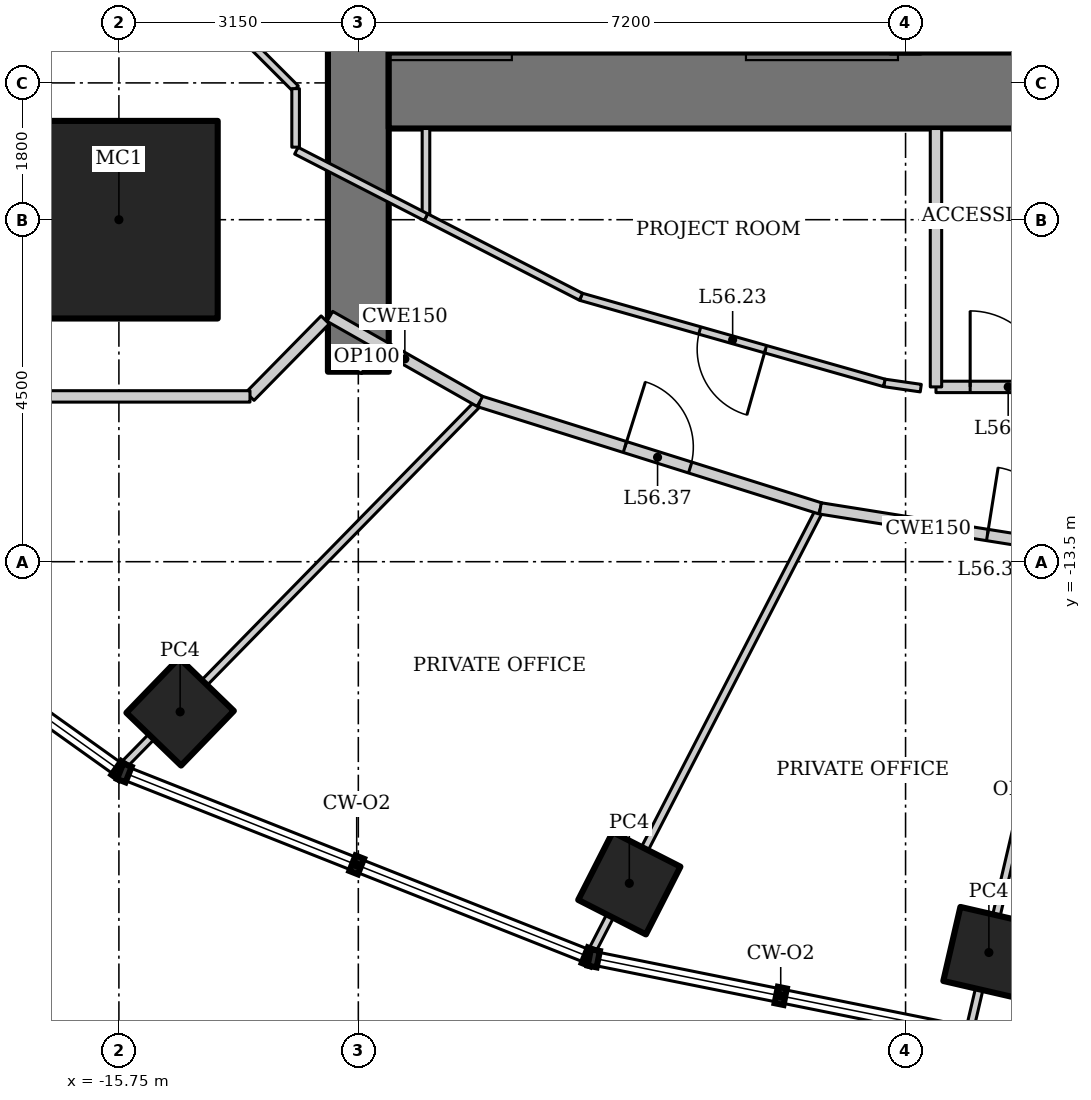
"""IFC4 building model, lengths in metres.
Left out: names, types, materials, properties, quantities, classifications, styles, units other than length and angle.
Written with IfcOpenShell. Run it as: python <this file> out.ifc"""

import sys

from ifc_helpers import new_model, si_unit, direction, frame, frame_2d, origin, origin_2d, place, context, subcontext, project, spatial, rectangle, hollow_rectangle, extrude, element, fill, save


model = new_model("IFC4")
c1 = context("Model", 3, precision=1e-05, world=origin(), true_north=direction((0.0, 1.0)))
c2 = subcontext(c1, "Body", "Model", "MODEL_VIEW")
j1 = project(units=[si_unit("LENGTHUNIT", "METRE"), si_unit("PLANEANGLEUNIT", "RADIAN")], contexts=[c1])
p1 = place(None, origin())
s1 = spatial("IfcSite", under=j1, at=p1, CompositionType="ELEMENT")
p2 = place(p1, origin())
s2 = spatial("IfcBuilding", under=s1, at=p2, CompositionType="ELEMENT")
p3 = place(p2, frame((0.0, 0.0, 241.0)))
s3 = spatial("IfcBuildingStorey", under=s2, at=p3, CompositionType="ELEMENT", Elevation=241.0)
p4 = place(p3, frame((-15.75, -9.0, 0.0), z_axis=(0.0, 0.0, 1.0), x_axis=(1.0, 0.0, 0.0)))
e1 = element("IfcColumn", 1, at=p4, inside=s3, PredefinedType="COLUMN", context=c2, shape_type="SweptSolid", body=[
    extrude(hollow_rectangle(XDim=2.6, YDim=2.6, WallThickness=0.13, at=origin_2d()), origin(), (0.0, 0.0, 1.0), 4.2),
])
for number, where, z_axis, x_axis in (
    (2, (-14.944, -15.475, 0.0), (0.0, 0.0, 1.0), (0.695, 0.719, 0.0)),
    (3, (-9.035, -17.731, 0.0), (0.0, 0.0, 1.0), (0.454, 0.891, 0.0)),
    (4, (-4.304, -18.642, 0.0), (0.0, 0.0, 1.0), (0.225, 0.974, 0.0)),
):
    element("IfcColumn", number, at=place(p3, frame(where, z_axis=z_axis, x_axis=x_axis)), inside=s3, PredefinedType="COLUMN", context=c2, shape_type="SweptSolid", body=[
        extrude(hollow_rectangle(XDim=1.0, YDim=1.0, WallThickness=0.08, at=origin_2d()), origin(), (0.0, 0.0, 1.0), 4.2),
    ])
p5 = place(p3, frame((-12.6, 11.0, 0.0), z_axis=(0.0, 0.0, 1.0), x_axis=(0.0, -1.0, 0.0)))
e5 = element("IfcWall", 5, at=p5, inside=s3, PredefinedType="SHEAR", context=c2, shape_type="SweptSolid", body=[
    extrude(rectangle(XDim=22.0, YDim=0.8, at=frame_2d((11.0, 0.0))), origin(), (0.0, 0.0, 1.0), 4.2),
])
p6 = place(p5, frame((10.1, 0.0, 0.0)))
e6 = element("IfcOpeningElement", 6, at=p6, cuts=e5, PredefinedType="OPENING", context=c2, shape_type="SweptSolid", body=[
    extrude(rectangle(XDim=1.8, YDim=2.1, at=frame_2d((0.9, 1.05))), frame((0.0, 0.41, 0.0), z_axis=(0.0, -1.0, 0.0), x_axis=(1.0, 0.0, 0.0)), (0.0, 0.0, 1.0), 0.82),
])
p7 = place(p3, frame((-12.2, -7.3, 0.0), z_axis=(0.0, 0.0, 1.0), x_axis=(1.0, 0.0, 0.0)))
e7 = element("IfcWall", 7, at=p7, inside=s3, PredefinedType="SHEAR", context=c2, shape_type="SweptSolid", body=[
    extrude(rectangle(XDim=24.4, YDim=1.0, at=frame_2d((12.2, 0.0))), origin(), (0.0, 0.0, 1.0), 4.2),
])
p8 = place(p3, frame((-15.709, -16.199, 0.0), z_axis=(0.0, 0.0, 1.0), x_axis=(0.699758297028, 0.71437967898, 0.0)))
e8 = element("IfcWall", 8, at=p8, inside=s3, PredefinedType="PARTITIONING", context=c2, shape_type="SweptSolid", body=[
    extrude(rectangle(XDim=6.729, YDim=0.1, at=frame_2d((3.365, 0.0))), origin(), (0.0, 0.0, 1.0), 3.41),
])
p9 = place(p3, frame((-9.54, -18.65, 0.0), z_axis=(0.0, 0.0, 1.0), x_axis=(0.458420942987, 0.888735190611, 0.0)))
e9 = element("IfcWall", 9, at=p9, inside=s3, PredefinedType="PARTITIONING", context=c2, shape_type="SweptSolid", body=[
    extrude(rectangle(XDim=6.584, YDim=0.1, at=frame_2d((3.292, 0.0))), origin(), (0.0, 0.0, 1.0), 3.293),
])
p10 = place(p3, frame((-4.556, -19.657, 0.0), z_axis=(0.0, 0.0, 1.0), x_axis=(0.227524978141, 0.973772244584, 0.0)))
e10 = element("IfcWall", 10, at=p10, inside=s3, PredefinedType="PARTITIONING", context=c2, shape_type="SweptSolid", body=[
    extrude(rectangle(XDim=6.48, YDim=0.1, at=frame_2d((3.24, 0.0))), origin(), (0.0, 0.0, 1.0), 3.293),
])
p11 = place(p3, frame((-11.001, -11.392, 0.0), z_axis=(0.0, 0.0, 1.0), x_axis=(0.954031103669, -0.299707612903, 0.0)))
e11 = element("IfcWall", 11, at=p11, inside=s3, PredefinedType="PARTITIONING", context=c2, shape_type="SweptSolid", body=[
    extrude(rectangle(XDim=4.695, YDim=0.15, at=frame_2d((2.348, 0.0))), origin(), (0.0, 0.0, 1.0), 4.05),
])
p12 = place(p11, frame((2.0, 0.0, 0.0)))
e12 = element("IfcOpeningElement", 12, at=p12, cuts=e11, PredefinedType="OPENING", context=c2, shape_type="SweptSolid", body=[
    extrude(rectangle(XDim=0.9, YDim=2.1, at=frame_2d((0.45, 1.05))), frame((0.0, 0.085, 0.0), z_axis=(0.0, -1.0, 0.0), x_axis=(1.0, 0.0, 0.0)), (0.0, 0.0, 1.0), 0.17),
])
p13 = place(p3, frame((-6.521, -12.799, 0.0), z_axis=(0.0, 0.0, 1.0), x_axis=(0.987554093087, -0.157279729233, 0.0)))
e13 = element("IfcWall", 13, at=p13, inside=s3, PredefinedType="PARTITIONING", context=c2, shape_type="SweptSolid", body=[
    extrude(rectangle(XDim=3.483, YDim=0.15, at=frame_2d((1.742, 0.0))), origin(), (0.0, 0.0, 1.0), 4.05),
])
p14 = place(p13, frame((2.226, 0.0, 0.0)))
e14 = element("IfcOpeningElement", 14, at=p14, cuts=e13, PredefinedType="OPENING", context=c2, shape_type="SweptSolid", body=[
    extrude(rectangle(XDim=0.9, YDim=2.1, at=frame_2d((0.45, 1.05))), frame((0.0, 0.085, 0.0), z_axis=(0.0, -1.0, 0.0), x_axis=(1.0, 0.0, 0.0)), (0.0, 0.0, 1.0), 0.17),
])
p15 = place(p3, frame((-5.0, -11.2, 0.0), z_axis=(0.0, 0.0, 1.0), x_axis=(1.0, 0.0, 0.0)))
e15 = element("IfcWall", 15, at=p15, inside=s3, PredefinedType="SOLIDWALL", context=c2, shape_type="SweptSolid", body=[
    extrude(rectangle(XDim=10.0, YDim=0.15, at=frame_2d((5.0, 0.0))), origin(), (0.0, 0.0, 1.0), 4.05),
])
p16 = place(p15, frame((0.45, 0.0, 0.0)))
e16 = element("IfcOpeningElement", 16, at=p16, cuts=e15, PredefinedType="OPENING", context=c2, shape_type="SweptSolid", body=[
    extrude(rectangle(XDim=1.0, YDim=2.1, at=frame_2d((0.5, 1.05))), frame((0.0, 0.085, 0.0), z_axis=(0.0, -1.0, 0.0), x_axis=(1.0, 0.0, 0.0)), (0.0, 0.0, 1.0), 0.17),
])
p17 = place(p15, frame((3.15, 0.0, 0.0)))
e17 = element("IfcOpeningElement", 17, at=p17, cuts=e15, PredefinedType="OPENING", context=c2, shape_type="SweptSolid", body=[
    extrude(rectangle(XDim=0.9, YDim=2.1, at=frame_2d((0.45, 1.05))), frame((0.0, 0.085, 0.0), z_axis=(0.0, -1.0, 0.0), x_axis=(1.0, 0.0, 0.0)), (0.0, 0.0, 1.0), 0.17),
])
p18 = place(p15, frame((6.55, 0.0, 0.0)))
e18 = element("IfcOpeningElement", 18, at=p18, cuts=e15, PredefinedType="OPENING", context=c2, shape_type="SweptSolid", body=[
    extrude(rectangle(XDim=0.9, YDim=2.1, at=frame_2d((0.45, 1.05))), frame((0.0, 0.085, 0.0), z_axis=(0.0, -1.0, 0.0), x_axis=(1.0, 0.0, 0.0)), (0.0, 0.0, 1.0), 0.17),
])
p19 = place(p15, frame((8.95, 0.0, 0.0)))
e19 = element("IfcOpeningElement", 19, at=p19, cuts=e15, PredefinedType="OPENING", context=c2, shape_type="SweptSolid", body=[
    extrude(rectangle(XDim=0.8, YDim=2.1, at=frame_2d((0.4, 1.05))), frame((0.0, 0.085, 0.0), z_axis=(0.0, -1.0, 0.0), x_axis=(1.0, 0.0, 0.0)), (0.0, 0.0, 1.0), 0.17),
])
p20 = place(p3, frame((-5.0, -7.8, 0.0), z_axis=(0.0, 0.0, 1.0), x_axis=(0.0, -1.0, 0.0)))
e20 = element("IfcWall", 20, at=p20, inside=s3, PredefinedType="SOLIDWALL", context=c2, shape_type="SweptSolid", body=[
    extrude(rectangle(XDim=3.4, YDim=0.15, at=frame_2d((1.7, 0.0))), origin(), (0.0, 0.0, 1.0), 4.05),
])
p21 = place(p3, frame((-11.71, -7.8, 0.0), z_axis=(0.0, 0.0, 1.0), x_axis=(0.0, -1.0, 0.0)))
e21 = element("IfcWall", 21, at=p21, inside=s3, PredefinedType="PARTITIONING", context=c2, shape_type="SweptSolid", body=[
    extrude(rectangle(XDim=1.167, YDim=0.1, at=frame_2d((0.583, 0.0))), origin(), (0.0, 0.0, 1.0), 4.05),
])
p22 = place(p3, frame((-5.2, -11.216, 0.0), z_axis=(0.0, 0.0, 1.0), x_axis=(-0.989797891768, 0.142478536811, 0.0)))
e22 = element("IfcWall", 22, at=p22, inside=s3, PredefinedType="PARTITIONING", context=c2, shape_type="SweptSolid", body=[
    extrude(rectangle(XDim=0.485, YDim=0.1, at=frame_2d((0.242, 0.0))), origin(), (0.0, 0.0, 1.0), 4.05),
])
p23 = place(p3, frame((-5.68, -11.147, 0.0), z_axis=(0.0, 0.0, 1.0), x_axis=(-0.961973498971, 0.273142796496, 0.0)))
e23 = element("IfcWall", 23, at=p23, inside=s3, PredefinedType="PARTITIONING", context=c2, shape_type="SweptSolid", body=[
    extrude(rectangle(XDim=4.148, YDim=0.1, at=frame_2d((2.074, 0.0))), origin(), (0.0, 0.0, 1.0), 4.05),
])
p24 = place(p23, frame((1.624, 0.0, 0.0)))
e24 = element("IfcOpeningElement", 24, at=p24, cuts=e23, PredefinedType="OPENING", context=c2, shape_type="SweptSolid", body=[
    extrude(rectangle(XDim=0.9, YDim=2.1, at=frame_2d((0.45, 1.05))), frame((0.0, 0.06, 0.0), z_axis=(0.0, -1.0, 0.0), x_axis=(1.0, 0.0, 0.0)), (0.0, 0.0, 1.0), 0.12),
])
p25 = place(p3, frame((-9.67, -10.014, 0.0), z_axis=(0.0, 0.0, 1.0), x_axis=(-0.889605609385, 0.456729525814, 0.0)))
e25 = element("IfcWall", 25, at=p25, inside=s3, PredefinedType="PARTITIONING", context=c2, shape_type="SweptSolid", body=[
    extrude(rectangle(XDim=2.293, YDim=0.1, at=frame_2d((1.146, 0.0))), origin(), (0.0, 0.0, 1.0), 4.05),
])
p26 = place(p3, frame((-12.6, -11.0, 0.0), z_axis=(0.0, 0.0, 1.0), x_axis=(0.493794495037, 0.869578631678, 0.0)))
e26 = element("IfcWall", 26, at=p26, inside=s3, PredefinedType="PARTITIONING", context=c2, shape_type="SweptSolid", body=[
    extrude(rectangle(XDim=0.449, YDim=0.1, at=frame_2d((0.225, 0.0))), origin(), (0.0, 0.0, 1.0), 4.05),
])
p27 = place(p3, frame((-12.975, -10.271, 0.0), z_axis=(0.0, 0.0, 1.0), x_axis=(0.869722107117, -0.493541747366, 0.0)))
e27 = element("IfcWall", 27, at=p27, inside=s3, PredefinedType="PARTITIONING", context=c2, shape_type="SweptSolid", body=[
    extrude(rectangle(XDim=2.27, YDim=0.15, at=frame_2d((1.135, 0.0))), origin(), (0.0, 0.0, 1.0), 4.05),
])
p28 = place(p3, frame((-11.71, -8.967, 0.0), z_axis=(0.0, 0.0, 1.0), x_axis=(-0.889638356137, 0.456665736935, 0.0)))
e28 = element("IfcWall", 28, at=p28, inside=s3, PredefinedType="PARTITIONING", context=c2, shape_type="SweptSolid", body=[
    extrude(rectangle(XDim=1.917, YDim=0.1, at=frame_2d((0.958, 0.0))), origin(), (0.0, 0.0, 1.0), 4.05),
])
p29 = place(p3, frame((-14.025, -6.675, 0.0), z_axis=(0.0, 0.0, 1.0), x_axis=(0.707106781187, -0.707106781187, 0.0)))
e29 = element("IfcWall", 29, at=p29, inside=s3, PredefinedType="PARTITIONING", context=c2, shape_type="SweptSolid", body=[
    extrude(rectangle(XDim=0.849, YDim=0.1, at=frame_2d((0.425, 0.0))), origin(), (0.0, 0.0, 1.0), 4.05),
])
p30 = place(p3, frame((-13.425, -7.275, 0.0), z_axis=(0.0, 0.0, 1.0), x_axis=(0.0, -1.0, 0.0)))
e30 = element("IfcWall", 30, at=p30, inside=s3, PredefinedType="PARTITIONING", context=c2, shape_type="SweptSolid", body=[
    extrude(rectangle(XDim=0.77, YDim=0.1, at=frame_2d((0.385, 0.0))), origin(), (0.0, 0.0, 1.0), 4.05),
])
p31 = place(p3, frame((-13.036, -10.319, 0.0), z_axis=(0.0, 0.0, 1.0), x_axis=(-0.701113567316, -0.713049623606, 0.0)))
e31 = element("IfcWall", 31, at=p31, inside=s3, PredefinedType="PARTITIONING", context=c2, shape_type="SweptSolid", body=[
    extrude(rectangle(XDim=1.411, YDim=0.15, at=frame_2d((0.706, 0.0))), origin(), (0.0, 0.0, 1.0), 4.05),
])
p32 = place(p3, frame((-14.025, -11.325, 0.0), z_axis=(0.0, 0.0, 1.0), x_axis=(-1.0, 0.0, 0.0)))
e32 = element("IfcWall", 32, at=p32, inside=s3, PredefinedType="PARTITIONING", context=c2, shape_type="SweptSolid", body=[
    extrude(rectangle(XDim=3.449, YDim=0.15, at=frame_2d((1.725, 0.0))), origin(), (0.0, 0.0, 1.0), 4.05),
])
p33 = place(p16, origin())
e33 = element("IfcDoor", 33, at=p33, inside=s3, OperationType="SINGLE_SWING_LEFT", PredefinedType="DOOR", context=c2, shape_type="SweptSolid", body=[
    extrude(rectangle(XDim=1.0, YDim=2.1, at=frame_2d((0.5, 1.05))), frame((0.0, 0.025, 0.0), z_axis=(0.0, -1.0, 0.0), x_axis=(1.0, 0.0, 0.0)), (0.0, 0.0, 1.0), 0.05),
])
fill(e16, e33)
p34 = place(p24, origin())
e34 = element("IfcDoor", 34, at=p34, inside=s3, OperationType="SINGLE_SWING_LEFT", PredefinedType="DOOR", context=c2, shape_type="SweptSolid", body=[
    extrude(rectangle(XDim=0.9, YDim=2.1, at=frame_2d((0.45, 1.05))), frame((0.0, 0.025, 0.0), z_axis=(0.0, -1.0, 0.0), x_axis=(1.0, 0.0, 0.0)), (0.0, 0.0, 1.0), 0.05),
])
fill(e24, e34)
p35 = place(p12, origin())
e35 = element("IfcDoor", 35, at=p35, inside=s3, OperationType="SINGLE_SWING_LEFT", PredefinedType="DOOR", context=c2, shape_type="SweptSolid", body=[
    extrude(rectangle(XDim=0.9, YDim=2.1, at=frame_2d((0.45, 1.05))), frame((0.0, 0.025, 0.0), z_axis=(0.0, -1.0, 0.0), x_axis=(1.0, 0.0, 0.0)), (0.0, 0.0, 1.0), 0.05),
])
fill(e12, e35)
p36 = place(p14, origin())
e36 = element("IfcDoor", 36, at=p36, inside=s3, OperationType="SINGLE_SWING_LEFT", PredefinedType="DOOR", context=c2, shape_type="SweptSolid", body=[
    extrude(rectangle(XDim=0.9, YDim=2.1, at=frame_2d((0.45, 1.05))), frame((0.0, 0.025, 0.0), z_axis=(0.0, -1.0, 0.0), x_axis=(1.0, 0.0, 0.0)), (0.0, 0.0, 1.0), 0.05),
])
fill(e14, e36)
save(model, sys.argv[1])
